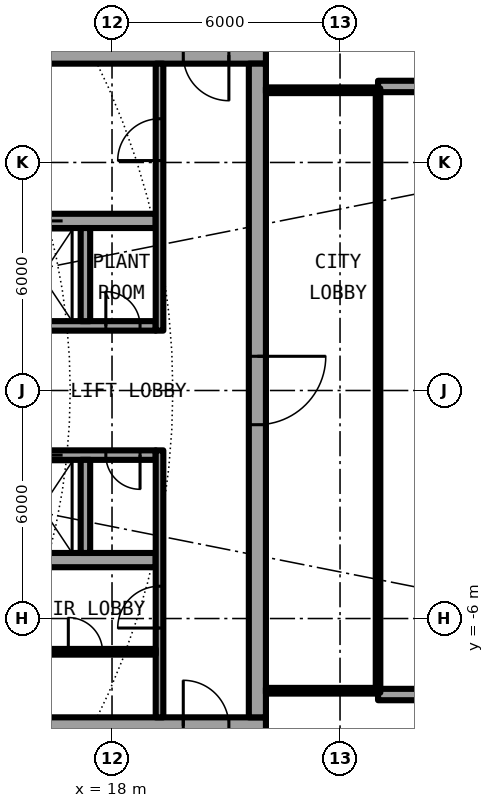
"""IFC4 building model, lengths in metres.
Left out: names, types, materials, properties, quantities, classifications, styles, units other than length and angle.
Written with IfcOpenShell. Run it as: python <this file> out.ifc"""

import sys

from ifc_helpers import new_model, si_unit, direction, frame, frame_2d, origin, place, context, subcontext, project, spatial, rectangle, extrude, element, fill, save


model = new_model("IFC4")
c1 = context("Model", 3, precision=1e-05, world=origin(), true_north=direction((0.0, 1.0)))
c2 = subcontext(c1, "Body", "Model", "MODEL_VIEW")
j1 = project(units=[si_unit("LENGTHUNIT", "METRE"), si_unit("PLANEANGLEUNIT", "RADIAN")], contexts=[c1])
p1 = place(None, origin())
s1 = spatial("IfcSite", under=j1, at=p1, CompositionType="ELEMENT")
p2 = place(p1, origin())
s2 = spatial("IfcBuilding", under=s1, at=p2, CompositionType="ELEMENT")
p3 = place(p2, frame((0.0, 0.0, 202.4)))
s3 = spatial("IfcBuildingStorey", under=s2, at=p3, CompositionType="ELEMENT", Elevation=202.4)
for number, where, z_axis, x_axis in (
    (1, (25.0, 8.0, 0.0), (0.0, 0.0, 1.0), (1.0, 0.0, 0.0)),
    (2, (25.0, -8.0, 0.0), (0.0, 0.0, 1.0), (1.0, 0.0, 0.0)),
):
    element("IfcWall", number, at=place(p3, frame(where, z_axis=z_axis, x_axis=x_axis)), inside=s3, PredefinedType="SOLIDWALL", context=c2, shape_type="SweptSolid", body=[
        extrude(rectangle(XDim=2.667, YDim=0.3, at=frame_2d((1.333, 0.0))), origin(), (0.0, 0.0, 1.0), 2.7),
    ])
p4 = place(p3, frame((22.05, 8.825, 0.0), z_axis=(0.0, 0.0, 1.0), x_axis=(-1.0, 0.0, 0.0)))
e3 = element("IfcWall", 3, at=p4, inside=s3, PredefinedType="SHEAR", context=c2, shape_type="SweptSolid", body=[
    extrude(rectangle(XDim=13.5, YDim=0.45, at=frame_2d((6.75, 0.0))), origin(), (0.0, 0.0, 1.0), 3.05),
])
p5 = place(p4, frame((0.975, 0.0, 0.0)))
e4 = element("IfcOpeningElement", 4, at=p5, cuts=e3, PredefinedType="OPENING", context=c2, shape_type="SweptSolid", body=[
    extrude(rectangle(XDim=1.2, YDim=2.3, at=frame_2d((0.6, 1.15))), frame((0.0, 0.235, 0.0), z_axis=(0.0, -1.0, 0.0), x_axis=(1.0, 0.0, 0.0)), (0.0, 0.0, 1.0), 0.47),
])
p6 = place(p3, frame((8.55, -8.825, 0.0), z_axis=(0.0, 0.0, 1.0), x_axis=(1.0, 0.0, 0.0)))
e5 = element("IfcWall", 5, at=p6, inside=s3, PredefinedType="SHEAR", context=c2, shape_type="SweptSolid", body=[
    extrude(rectangle(XDim=13.5, YDim=0.45, at=frame_2d((6.75, 0.0))), origin(), (0.0, 0.0, 1.0), 3.05),
])
p7 = place(p6, frame((11.325, 0.0, 0.0)))
e6 = element("IfcOpeningElement", 6, at=p7, cuts=e5, PredefinedType="OPENING", context=c2, shape_type="SweptSolid", body=[
    extrude(rectangle(XDim=1.2, YDim=2.3, at=frame_2d((0.6, 1.15))), frame((0.0, 0.235, 0.0), z_axis=(0.0, -1.0, 0.0), x_axis=(1.0, 0.0, 0.0)), (0.0, 0.0, 1.0), 0.47),
])
p8 = place(p3, frame((21.825, 8.6, 0.0), z_axis=(0.0, 0.0, 1.0), x_axis=(0.0, -1.0, 0.0)))
e7 = element("IfcWall", 7, at=p8, inside=s3, PredefinedType="SHEAR", context=c2, shape_type="SweptSolid", body=[
    extrude(rectangle(XDim=17.2, YDim=0.45, at=frame_2d((8.6, 0.0))), origin(), (0.0, 0.0, 1.0), 3.05),
])
p9 = place(p8, frame((7.7, 0.0, 0.0)))
e8 = element("IfcOpeningElement", 8, at=p9, cuts=e7, PredefinedType="OPENING", context=c2, shape_type="SweptSolid", body=[
    extrude(rectangle(XDim=1.8, YDim=2.3, at=frame_2d((0.9, 1.15))), frame((0.0, 0.235, 0.0), z_axis=(0.0, -1.0, 0.0), x_axis=(1.0, 0.0, 0.0)), (0.0, 0.0, 1.0), 0.47),
])
p10 = place(p3, frame((9.0, 1.7, 0.0), z_axis=(0.0, 0.0, 1.0), x_axis=(1.0, 0.0, 0.0)))
e9 = element("IfcWall", 9, at=p10, inside=s3, PredefinedType="SHEAR", context=c2, shape_type="SweptSolid", body=[
    extrude(rectangle(XDim=10.15, YDim=0.25, at=frame_2d((5.075, 0.0))), origin(), (0.0, 0.0, 1.0), 3.05),
])
p11 = place(p10, frame((1.663, 0.0, 0.0)))
e10 = element("IfcOpeningElement", 10, at=p11, cuts=e9, PredefinedType="OPENING", context=c2, shape_type="SweptSolid", body=[
    extrude(rectangle(XDim=0.9, YDim=2.3, at=frame_2d((0.45, 1.15))), frame((0.0, 0.135, 0.0), z_axis=(0.0, -1.0, 0.0), x_axis=(1.0, 0.0, 0.0)), (0.0, 0.0, 1.0), 0.27),
])
p12 = place(p10, frame((4.675, 0.0, 0.0)))
e11 = element("IfcOpeningElement", 11, at=p12, cuts=e9, PredefinedType="OPENING", context=c2, shape_type="SweptSolid", body=[
    extrude(rectangle(XDim=0.9, YDim=2.3, at=frame_2d((0.45, 1.15))), frame((0.0, 0.135, 0.0), z_axis=(0.0, -1.0, 0.0), x_axis=(1.0, 0.0, 0.0)), (0.0, 0.0, 1.0), 0.27),
])
p13 = place(p10, frame((8.837, 0.0, 0.0)))
e12 = element("IfcOpeningElement", 12, at=p13, cuts=e9, PredefinedType="OPENING", context=c2, shape_type="SweptSolid", body=[
    extrude(rectangle(XDim=0.9, YDim=2.3, at=frame_2d((0.45, 1.15))), frame((0.0, 0.135, 0.0), z_axis=(0.0, -1.0, 0.0), x_axis=(1.0, 0.0, 0.0)), (0.0, 0.0, 1.0), 0.27),
])
p14 = place(p3, frame((9.0, 4.462, 0.0), z_axis=(0.0, 0.0, 1.0), x_axis=(1.0, 0.0, 0.0)))
e13 = element("IfcWall", 13, at=p14, inside=s3, PredefinedType="SHEAR", context=c2, shape_type="SweptSolid", body=[
    extrude(rectangle(XDim=10.15, YDim=0.375, at=frame_2d((5.075, 0.0))), origin(), (0.0, 0.0, 1.0), 3.05),
])
p15 = place(p14, frame((6.6, 0.0, 0.0)))
e14 = element("IfcOpeningElement", 14, at=p15, cuts=e13, PredefinedType="OPENING", context=c2, shape_type="SweptSolid", body=[
    extrude(rectangle(XDim=1.1, YDim=2.3, at=frame_2d((0.55, 1.15))), frame((0.0, 0.198, 0.0), z_axis=(0.0, -1.0, 0.0), x_axis=(1.0, 0.0, 0.0)), (0.0, 0.0, 1.0), 0.395),
])
p16 = place(p3, frame((17.3, 1.825, 0.0), z_axis=(0.0, 0.0, 1.0), x_axis=(0.0, 1.0, 0.0)))
e15 = element("IfcWall", 15, at=p16, inside=s3, PredefinedType="SOLIDWALL", context=c2, shape_type="SweptSolid", body=[
    extrude(rectangle(XDim=2.45, YDim=0.25, at=frame_2d((1.225, 0.0))), origin(), (0.0, 0.0, 1.0), 2.7),
])
p17 = place(p3, frame((19.25, 1.575, 0.0), z_axis=(0.0, 0.0, 1.0), x_axis=(0.0, 1.0, 0.0)))
e16 = element("IfcWall", 16, at=p17, inside=s3, PredefinedType="SOLIDWALL", context=c2, shape_type="SweptSolid", body=[
    extrude(rectangle(XDim=7.025, YDim=0.2, at=frame_2d((3.513, 0.0))), origin(), (0.0, 0.0, 1.0), 2.7),
])
p18 = place(p17, frame((4.475, 0.0, 0.0)))
e17 = element("IfcOpeningElement", 17, at=p18, cuts=e16, PredefinedType="OPENING", context=c2, shape_type="SweptSolid", body=[
    extrude(rectangle(XDim=1.1, YDim=2.3, at=frame_2d((0.55, 1.15))), frame((0.0, 0.11, 0.0), z_axis=(0.0, -1.0, 0.0), x_axis=(1.0, 0.0, 0.0)), (0.0, 0.0, 1.0), 0.22),
])
p19 = place(p3, frame((19.15, -1.7, 0.0), z_axis=(0.0, 0.0, 1.0), x_axis=(-1.0, 0.0, 0.0)))
e18 = element("IfcWall", 18, at=p19, inside=s3, PredefinedType="SHEAR", context=c2, shape_type="SweptSolid", body=[
    extrude(rectangle(XDim=10.15, YDim=0.25, at=frame_2d((5.075, 0.0))), origin(), (0.0, 0.0, 1.0), 3.05),
])
p20 = place(p19, frame((8.663, 0.0, 0.0)))
e19 = element("IfcOpeningElement", 19, at=p20, cuts=e18, PredefinedType="OPENING", context=c2, shape_type="SweptSolid", body=[
    extrude(rectangle(XDim=1.1, YDim=2.3, at=frame_2d((0.55, 1.15))), frame((0.0, 0.135, 0.0), z_axis=(0.0, -1.0, 0.0), x_axis=(1.0, 0.0, 0.0)), (0.0, 0.0, 1.0), 0.27),
])
p21 = place(p19, frame((6.6, 0.0, 0.0)))
e20 = element("IfcOpeningElement", 20, at=p21, cuts=e18, PredefinedType="OPENING", context=c2, shape_type="SweptSolid", body=[
    extrude(rectangle(XDim=1.1, YDim=2.3, at=frame_2d((0.55, 1.15))), frame((0.0, 0.135, 0.0), z_axis=(0.0, -1.0, 0.0), x_axis=(1.0, 0.0, 0.0)), (0.0, 0.0, 1.0), 0.27),
])
p22 = place(p19, frame((4.6, 0.0, 0.0)))
e21 = element("IfcOpeningElement", 21, at=p22, cuts=e18, PredefinedType="OPENING", context=c2, shape_type="SweptSolid", body=[
    extrude(rectangle(XDim=1.1, YDim=2.3, at=frame_2d((0.55, 1.15))), frame((0.0, 0.135, 0.0), z_axis=(0.0, -1.0, 0.0), x_axis=(1.0, 0.0, 0.0)), (0.0, 0.0, 1.0), 0.27),
])
p23 = place(p19, frame((2.45, 0.0, 0.0)))
e22 = element("IfcOpeningElement", 22, at=p23, cuts=e18, PredefinedType="OPENING", context=c2, shape_type="SweptSolid", body=[
    extrude(rectangle(XDim=1.1, YDim=2.3, at=frame_2d((0.55, 1.15))), frame((0.0, 0.135, 0.0), z_axis=(0.0, -1.0, 0.0), x_axis=(1.0, 0.0, 0.0)), (0.0, 0.0, 1.0), 0.27),
])
p24 = place(p19, frame((0.413, 0.0, 0.0)))
e23 = element("IfcOpeningElement", 23, at=p24, cuts=e18, PredefinedType="OPENING", context=c2, shape_type="SweptSolid", body=[
    extrude(rectangle(XDim=0.9, YDim=2.3, at=frame_2d((0.45, 1.15))), frame((0.0, 0.135, 0.0), z_axis=(0.0, -1.0, 0.0), x_axis=(1.0, 0.0, 0.0)), (0.0, 0.0, 1.0), 0.27),
])
p25 = place(p3, frame((9.0, -4.462, 0.0), z_axis=(0.0, 0.0, 1.0), x_axis=(1.0, 0.0, 0.0)))
e24 = element("IfcWall", 24, at=p25, inside=s3, PredefinedType="SHEAR", context=c2, shape_type="SweptSolid", body=[
    extrude(rectangle(XDim=10.15, YDim=0.375, at=frame_2d((5.075, 0.0))), origin(), (0.0, 0.0, 1.0), 3.05),
])
p26 = place(p3, frame((17.3, -1.825, 0.0), z_axis=(0.0, 0.0, 1.0), x_axis=(0.0, -1.0, 0.0)))
e25 = element("IfcWall", 25, at=p26, inside=s3, PredefinedType="SOLIDWALL", context=c2, shape_type="SweptSolid", body=[
    extrude(rectangle(XDim=2.45, YDim=0.25, at=frame_2d((1.225, 0.0))), origin(), (0.0, 0.0, 1.0), 2.7),
])
p27 = place(p3, frame((19.25, -8.6, 0.0), z_axis=(0.0, 0.0, 1.0), x_axis=(0.0, 1.0, 0.0)))
e26 = element("IfcWall", 26, at=p27, inside=s3, PredefinedType="SOLIDWALL", context=c2, shape_type="SweptSolid", body=[
    extrude(rectangle(XDim=7.025, YDim=0.2, at=frame_2d((3.513, 0.0))), origin(), (0.0, 0.0, 1.0), 2.7),
])
p28 = place(p27, frame((2.35, 0.0, 0.0)))
e27 = element("IfcOpeningElement", 27, at=p28, cuts=e26, PredefinedType="OPENING", context=c2, shape_type="SweptSolid", body=[
    extrude(rectangle(XDim=1.1, YDim=2.3, at=frame_2d((0.55, 1.15))), frame((0.0, 0.11, 0.0), z_axis=(0.0, -1.0, 0.0), x_axis=(1.0, 0.0, 0.0)), (0.0, 0.0, 1.0), 0.22),
])
p29 = place(p3, frame((15.45, -6.875, 0.0), z_axis=(0.0, 0.0, 1.0), x_axis=(1.0, 0.0, 0.0)))
e28 = element("IfcWall", 28, at=p29, inside=s3, PredefinedType="PARTITIONING", context=c2, shape_type="SweptSolid", body=[
    extrude(rectangle(XDim=3.7, YDim=0.15, at=frame_2d((1.85, 0.0))), origin(), (0.0, 0.0, 1.0), 2.7),
])
p30 = place(p29, frame((1.4, 0.0, 0.0)))
e29 = element("IfcOpeningElement", 29, at=p30, cuts=e28, PredefinedType="OPENING", context=c2, shape_type="SweptSolid", body=[
    extrude(rectangle(XDim=0.9, YDim=2.3, at=frame_2d((0.45, 1.15))), frame((0.0, 0.085, 0.0), z_axis=(0.0, -1.0, 0.0), x_axis=(1.0, 0.0, 0.0)), (0.0, 0.0, 1.0), 0.17),
])
for number, where, z_axis, x_axis in (
    (30, (22.05, -7.9, 0.0), (0.0, 0.0, 1.0), (1.0, 0.0, 0.0)),
    (31, (22.05, 7.9, 0.0), (0.0, 0.0, 1.0), (1.0, 0.0, 0.0)),
):
    element("IfcWall", number, at=place(p3, frame(where, z_axis=z_axis, x_axis=x_axis)), inside=s3, PredefinedType="PARTITIONING", context=c2, shape_type="SweptSolid", body=[
        extrude(rectangle(XDim=2.89, YDim=0.15, at=frame_2d((1.445, 0.0))), origin(), (0.0, 0.0, 1.0), 2.7),
    ])
p31 = place(p3, frame((25.0, -7.95, 0.0), z_axis=(0.0, 0.0, 1.0), x_axis=(0.0, 1.0, 0.0)))
e32 = element("IfcWall", 32, at=p31, inside=s3, PredefinedType="PARTITIONING", context=c2, shape_type="SweptSolid", body=[
    extrude(rectangle(XDim=15.9, YDim=0.12, at=frame_2d((7.95, 0.0))), origin(), (0.0, 0.0, 1.0), 2.7),
])
p32 = place(p31, frame((0.95, 0.0, 0.1)))
e33 = element("IfcOpeningElement", 33, at=p32, cuts=e32, PredefinedType="OPENING", context=c2, shape_type="SweptSolid", body=[
    extrude(rectangle(XDim=14.0, YDim=2.35, at=frame_2d((7.0, 1.175))), frame((0.0, 0.07, 0.0), z_axis=(0.0, -1.0, 0.0), x_axis=(1.0, 0.0, 0.0)), (0.0, 0.0, 1.0), 0.14),
])
p33 = place(p15, origin())
e34 = element("IfcDoor", 34, at=p33, inside=s3, OperationType="DOUBLE_DOOR_SLIDING", PredefinedType="DOOR", context=c2, shape_type="SweptSolid", body=[
    extrude(rectangle(XDim=1.1, YDim=2.3, at=frame_2d((0.55, 1.15))), frame((0.0, 0.025, 0.0), z_axis=(0.0, -1.0, 0.0), x_axis=(1.0, 0.0, 0.0)), (0.0, 0.0, 1.0), 0.05),
])
fill(e14, e34)
p34 = place(p23, origin())
e35 = element("IfcDoor", 35, at=p34, inside=s3, OperationType="DOUBLE_DOOR_SLIDING", PredefinedType="DOOR", context=c2, shape_type="SweptSolid", body=[
    extrude(rectangle(XDim=1.1, YDim=2.3, at=frame_2d((0.55, 1.15))), frame((0.0, 0.025, 0.0), z_axis=(0.0, -1.0, 0.0), x_axis=(1.0, 0.0, 0.0)), (0.0, 0.0, 1.0), 0.05),
])
fill(e22, e35)
p35 = place(p13, origin())
e36 = element("IfcDoor", 36, at=p35, inside=s3, OperationType="SINGLE_SWING_LEFT", PredefinedType="DOOR", context=c2, shape_type="SweptSolid", body=[
    extrude(rectangle(XDim=0.9, YDim=2.3, at=frame_2d((0.45, 1.15))), frame((0.0, 0.025, 0.0), z_axis=(0.0, -1.0, 0.0), x_axis=(1.0, 0.0, 0.0)), (0.0, 0.0, 1.0), 0.05),
])
fill(e12, e36)
p36 = place(p24, origin())
e37 = element("IfcDoor", 37, at=p36, inside=s3, OperationType="SINGLE_SWING_RIGHT", PredefinedType="DOOR", context=c2, shape_type="SweptSolid", body=[
    extrude(rectangle(XDim=0.9, YDim=2.3, at=frame_2d((0.45, 1.15))), frame((0.0, 0.025, 0.0), z_axis=(0.0, -1.0, 0.0), x_axis=(1.0, 0.0, 0.0)), (0.0, 0.0, 1.0), 0.05),
])
fill(e23, e37)
p37 = place(p30, origin())
e38 = element("IfcDoor", 38, at=p37, inside=s3, OperationType="SINGLE_SWING_LEFT", PredefinedType="DOOR", context=c2, shape_type="SweptSolid", body=[
    extrude(rectangle(XDim=0.9, YDim=2.3, at=frame_2d((0.45, 1.15))), frame((0.0, 0.025, 0.0), z_axis=(0.0, -1.0, 0.0), x_axis=(1.0, 0.0, 0.0)), (0.0, 0.0, 1.0), 0.05),
])
fill(e29, e38)
p38 = place(p18, origin())
e39 = element("IfcDoor", 39, at=p38, inside=s3, OperationType="SINGLE_SWING_LEFT", PredefinedType="DOOR", context=c2, shape_type="SweptSolid", body=[
    extrude(rectangle(XDim=1.1, YDim=2.3, at=frame_2d((0.55, 1.15))), frame((0.0, 0.025, 0.0), z_axis=(0.0, -1.0, 0.0), x_axis=(1.0, 0.0, 0.0)), (0.0, 0.0, 1.0), 0.05),
])
fill(e17, e39)
p39 = place(p28, origin())
e40 = element("IfcDoor", 40, at=p39, inside=s3, OperationType="SINGLE_SWING_RIGHT", PredefinedType="DOOR", context=c2, shape_type="SweptSolid", body=[
    extrude(rectangle(XDim=1.1, YDim=2.3, at=frame_2d((0.55, 1.15))), frame((0.0, 0.025, 0.0), z_axis=(0.0, -1.0, 0.0), x_axis=(1.0, 0.0, 0.0)), (0.0, 0.0, 1.0), 0.05),
])
fill(e27, e40)
p40 = place(p5, origin())
e41 = element("IfcDoor", 41, at=p40, inside=s3, OperationType="SINGLE_SWING_RIGHT", PredefinedType="DOOR", context=c2, shape_type="SweptSolid", body=[
    extrude(rectangle(XDim=1.2, YDim=2.3, at=frame_2d((0.6, 1.15))), frame((0.0, 0.025, 0.0), z_axis=(0.0, -1.0, 0.0), x_axis=(1.0, 0.0, 0.0)), (0.0, 0.0, 1.0), 0.05),
])
fill(e4, e41)
p41 = place(p7, origin())
e42 = element("IfcDoor", 42, at=p41, inside=s3, OperationType="SINGLE_SWING_LEFT", PredefinedType="DOOR", context=c2, shape_type="SweptSolid", body=[
    extrude(rectangle(XDim=1.2, YDim=2.3, at=frame_2d((0.6, 1.15))), frame((0.0, 0.025, 0.0), z_axis=(0.0, -1.0, 0.0), x_axis=(1.0, 0.0, 0.0)), (0.0, 0.0, 1.0), 0.05),
])
fill(e6, e42)
p42 = place(p9, origin())
e43 = element("IfcDoor", 43, at=p42, inside=s3, OperationType="SINGLE_SWING_LEFT", PredefinedType="DOOR", context=c2, shape_type="SweptSolid", body=[
    extrude(rectangle(XDim=1.8, YDim=2.3, at=frame_2d((0.9, 1.15))), frame((0.0, 0.025, 0.0), z_axis=(0.0, -1.0, 0.0), x_axis=(1.0, 0.0, 0.0)), (0.0, 0.0, 1.0), 0.05),
])
fill(e8, e43)
p43 = place(p32, origin())
e44 = element("IfcWindow", 44, at=p43, inside=s3, PartitioningType="SINGLE_PANEL", PredefinedType="WINDOW", context=c2, shape_type="SweptSolid", body=[
    extrude(rectangle(XDim=14.0, YDim=2.35, at=frame_2d((7.0, 1.175))), frame((0.0, 0.03, 0.0), z_axis=(0.0, -1.0, 0.0), x_axis=(1.0, 0.0, 0.0)), (0.0, 0.0, 1.0), 0.06),
])
fill(e33, e44)
save(model, sys.argv[1])
